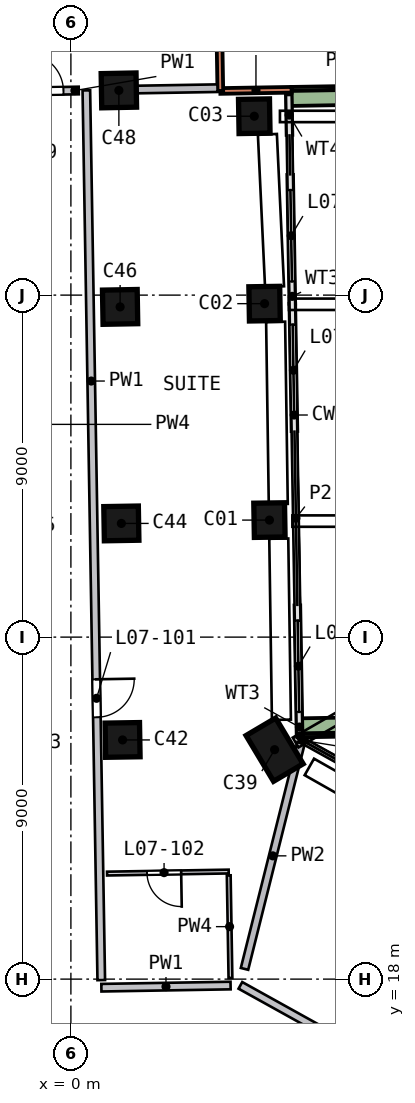
"""IFC4 building model, lengths in metres.
Left out: names, types, materials, properties, quantities, classifications, styles, units other than length and angle.
Written with IfcOpenShell. Run it as: python <this file> out.ifc"""

import sys

from ifc_helpers import new_model, si_unit, direction, frame, frame_2d, origin, origin_2d, place, context, subcontext, project, spatial, rectangle, extrude, element, fill, save


model = new_model("IFC4")
c1 = context("Model", 3, precision=1e-05, world=origin(), true_north=direction((0.0, 1.0)))
c2 = subcontext(c1, "Body", "Model", "MODEL_VIEW")
j1 = project(units=[si_unit("LENGTHUNIT", "METRE"), si_unit("PLANEANGLEUNIT", "RADIAN")], contexts=[c1])
p1 = place(None, origin())
s1 = spatial("IfcSite", under=j1, at=p1, CompositionType="ELEMENT")
p2 = place(p1, origin())
s2 = spatial("IfcBuilding", under=s1, at=p2, CompositionType="ELEMENT")
p3 = place(p2, frame((0.0, 0.0, 39.0)))
s3 = spatial("IfcBuildingStorey", under=s2, at=p3, CompositionType="ELEMENT", Elevation=39.0)
p4 = place(p3, frame((5.397, 30.059, 0.0), z_axis=(-0.142396599, 0.017420861, 0.989656366), x_axis=(-0.013831986, 0.99971245, -0.019588091)))
e1 = element("IfcColumn", 1, at=p4, inside=s3, PredefinedType="COLUMN", context=c2, shape_type="SweptSolid", body=[
    extrude(rectangle(XDim=0.9, YDim=0.8, at=origin_2d()), origin(), (0.0, 0.0, 1.0), 3.223),
])
p5 = place(p3, frame((5.302, 35.763, 0.0), z_axis=(-0.168451183, 0.009731394, 0.98566196), x_axis=(-0.01451993, 0.999818275, -0.012352637)))
e2 = element("IfcColumn", 2, at=p5, inside=s3, PredefinedType="COLUMN", context=c2, shape_type="SweptSolid", body=[
    extrude(rectangle(XDim=0.9, YDim=0.8, at=origin_2d()), origin(), (0.0, 0.0, 1.0), 3.236),
])
p6 = place(p3, frame((5.059, 40.706, 0.0), z_axis=(-0.190752832, 0.001427453, 0.981637061), x_axis=(-0.015840805, 0.999864255, -0.004532162)))
e3 = element("IfcColumn", 3, at=p6, inside=s3, PredefinedType="COLUMN", context=c2, shape_type="SweptSolid", body=[
    extrude(rectangle(XDim=0.9, YDim=0.8, at=origin_2d()), origin(), (0.0, 0.0, 1.0), 3.25),
])
p7 = place(p3, frame((5.499, 24.007, 0.0), z_axis=(-0.114391427, 0.025234521, 0.99311521), x_axis=(0.506584299, -0.858455681, 0.080163528)))
e4 = element("IfcColumn", 4, at=p7, inside=s3, PredefinedType="COLUMN", context=c2, shape_type="SweptSolid", body=[
    extrude(rectangle(XDim=1.4, YDim=0.9, at=origin_2d()), origin(), (0.0, 0.0, 1.0), 3.212),
])
p8 = place(p3, frame((1.5, 24.287, 0.0), z_axis=(-0.115550998, 0.006157652, 0.993282462), x_axis=(-0.015874823, 0.999841621, -0.008045071)))
e5 = element("IfcColumn", 5, at=p8, inside=s3, PredefinedType="COLUMN", context=c2, shape_type="SweptSolid", body=[
    extrude(rectangle(XDim=0.9, YDim=0.9, at=origin_2d()), origin(), (0.0, 0.0, 1.0), 3.211),
])
p9 = place(p3, frame((1.5, 29.993, 0.0), z_axis=(-0.141972782, -0.001060629, 0.989869994), x_axis=(-0.016583092, 0.999861637, -0.001307106)))
e6 = element("IfcColumn", 6, at=p9, inside=s3, PredefinedType="COLUMN", context=c2, shape_type="SweptSolid", body=[
    extrude(rectangle(XDim=0.9, YDim=0.9, at=origin_2d()), origin(), (0.0, 0.0, 1.0), 3.223),
])
p10 = place(p3, frame((1.5, 35.7, 0.0), z_axis=(-0.168086942, -0.008223284, 0.985737875), x_axis=(-0.017649546, 0.999830021, 0.005331263)))
e7 = element("IfcColumn", 7, at=p10, inside=s3, PredefinedType="COLUMN", context=c2, shape_type="SweptSolid", body=[
    extrude(rectangle(XDim=0.9, YDim=0.9, at=origin_2d()), origin(), (0.0, 0.0, 1.0), 3.236),
])
p11 = place(p3, frame((1.5, 41.406, 0.0), z_axis=(-0.193840405, -0.015315044, 0.980913527), x_axis=(-0.019055811, 0.999748273, 0.011843452)))
e8 = element("IfcColumn", 8, at=p11, inside=s3, PredefinedType="COLUMN", context=c2, shape_type="SweptSolid", body=[
    extrude(rectangle(XDim=0.9, YDim=0.9, at=origin_2d()), origin(), (0.0, 0.0, 1.0), 3.252),
])
p12 = place(p3, frame((5.807, 41.403, 0.0), z_axis=(0.0, 0.0, 1.0), x_axis=(-0.999861104, -0.016666522, 0.0)))
e9 = element("IfcWall", 9, at=p12, inside=s3, PredefinedType="SOLIDWALL", context=c2, shape_type="SweptSolid", body=[
    extrude(rectangle(XDim=1.875, YDim=0.15, at=frame_2d((0.938, 0.0))), origin(), (0.0, 0.0, 1.0), 3.19),
])
p13 = place(p3, frame((3.932, 41.372, 0.0), z_axis=(0.0, 0.0, 1.0), x_axis=(-0.016684694, 0.999860801, 0.0)))
e10 = element("IfcWall", 10, at=p13, inside=s3, PredefinedType="SOLIDWALL", context=c2, shape_type="SweptSolid", body=[
    extrude(rectangle(XDim=1.8, YDim=0.15, at=frame_2d((0.9, 0.0))), origin(), (0.0, 0.0, 1.0), 3.19),
])
p14 = place(p3, frame((6.017, 24.433, 0.0), z_axis=(0.0, 0.0, 1.0), x_axis=(-0.016793497, 0.999858979, 0.0)))
e11 = element("IfcWall", 11, at=p14, inside=s3, PredefinedType="SOLIDWALL", context=c2, shape_type="SweptSolid", body=[
    extrude(rectangle(XDim=3.402, YDim=0.15, at=frame_2d((1.701, 0.0))), origin(), (0.0, 0.0, 1.0), 2.425),
])
p15 = place(p14, frame((0.602, 0.0, 0.0)))
e12 = element("IfcOpeningElement", 12, at=p15, cuts=e11, PredefinedType="OPENING", context=c2, shape_type="SweptSolid", body=[
    extrude(rectangle(XDim=2.4, YDim=2.4, at=frame_2d((1.2, 1.2))), frame((0.0, 0.085, 0.0), z_axis=(0.0, -1.0, 0.0), x_axis=(1.0, 0.0, 0.0)), (0.0, 0.0, 1.0), 0.17),
])
p16 = place(p3, frame((5.883, 32.423, 0.0), z_axis=(0.0, 0.0, 1.0), x_axis=(-0.016762715, 0.999859496, 0.0)))
e13 = element("IfcWall", 13, at=p16, inside=s3, PredefinedType="SOLIDWALL", context=c2, shape_type="SweptSolid", body=[
    extrude(rectangle(XDim=3.35, YDim=0.15, at=frame_2d((1.675, 0.0))), origin(), (0.0, 0.0, 1.0), 2.425),
])
p17 = place(p16, frame((0.4, 0.0, 0.0)))
e14 = element("IfcOpeningElement", 14, at=p17, cuts=e13, PredefinedType="OPENING", context=c2, shape_type="SweptSolid", body=[
    extrude(rectangle(XDim=2.4, YDim=2.4, at=frame_2d((1.2, 1.2))), frame((0.0, 0.085, 0.0), z_axis=(0.0, -1.0, 0.0), x_axis=(1.0, 0.0, 0.0)), (0.0, 0.0, 1.0), 0.17),
])
p18 = place(p3, frame((5.826, 35.772, 0.0), z_axis=(0.0, 0.0, 1.0), x_axis=(-0.016705144, 0.999860459, 0.0)))
e15 = element("IfcWall", 15, at=p18, inside=s3, PredefinedType="SOLIDWALL", context=c2, shape_type="SweptSolid", body=[
    extrude(rectangle(XDim=3.391, YDim=0.15, at=frame_2d((1.695, 0.0))), origin(), (0.0, 0.0, 1.0), 2.425),
])
p19 = place(p18, frame((0.591, 0.0, 0.0)))
e16 = element("IfcOpeningElement", 16, at=p19, cuts=e15, PredefinedType="OPENING", context=c2, shape_type="SweptSolid", body=[
    extrude(rectangle(XDim=2.4, YDim=2.4, at=frame_2d((1.2, 1.2))), frame((0.0, 0.085, 0.0), z_axis=(0.0, -1.0, 0.0), x_axis=(1.0, 0.0, 0.0)), (0.0, 0.0, 1.0), 0.17),
])
p20 = place(p3, frame((5.752, 40.217, 0.0), z_axis=(0.0, 0.0, 1.0), x_axis=(-0.016668264, 0.999861075, 0.0)))
e17 = element("IfcWall", 17, at=p20, inside=s3, PredefinedType="SOLIDWALL", context=c2, shape_type="SweptSolid", body=[
    extrude(rectangle(XDim=1.04, YDim=0.15, at=frame_2d((0.52, 0.0))), origin(), (0.0, 0.0, 1.0), 2.425),
])
p21 = place(p3, frame((6.089, 24.614, 0.0), z_axis=(0.0, 0.0, 1.0), x_axis=(0.999859055, 0.016788963, 0.0)))
e18 = element("IfcWall", 18, at=p21, inside=s3, PredefinedType="SOLIDWALL", context=c2, shape_type="SweptSolid", body=[
    extrude(rectangle(XDim=3.199, YDim=0.5, at=frame_2d((1.6, 0.0))), origin(), (0.0, 0.0, 1.0), 0.7),
])
p22 = place(p3, frame((8.51, 41.274, 0.0), z_axis=(0.0, 0.0, 1.0), x_axis=(-0.999859982, -0.01673368, 0.0)))
e19 = element("IfcWall", 19, at=p22, inside=s3, PredefinedType="SOLIDWALL", context=c2, shape_type="SweptSolid", body=[
    extrude(rectangle(XDim=2.699, YDim=0.5, at=frame_2d((1.35, 0.0))), origin(), (0.0, 0.0, 1.0), 0.7),
])
p23 = place(p3, frame((-1.595, 41.354, 0.0), z_axis=(0.0, 0.0, 1.0), x_axis=(0.999858912, 0.016797521, 0.0)))
e20 = element("IfcWall", 20, at=p23, inside=s3, PredefinedType="SOLIDWALL", context=c2, shape_type="SweptSolid", body=[
    extrude(rectangle(XDim=1.802, YDim=0.2, at=frame_2d((0.901, 0.0))), origin(), (0.0, 0.0, 1.0), 3.19),
])
p24 = place(p23, frame((0.4, 0.0, 0.0)))
e21 = element("IfcOpeningElement", 21, at=p24, cuts=e20, PredefinedType="OPENING", context=c2, shape_type="SweptSolid", body=[
    extrude(rectangle(XDim=1.0, YDim=2.1, at=frame_2d((0.5, 1.05))), frame((0.0, 0.11, 0.0), z_axis=(0.0, -1.0, 0.0), x_axis=(1.0, 0.0, 0.0)), (0.0, 0.0, 1.0), 0.22),
])
p25 = place(p3, frame((0.406, 41.388, 0.0), z_axis=(0.0, 0.0, 1.0), x_axis=(0.016764935, -0.999859459, 0.0)))
e22 = element("IfcWall", 22, at=p25, inside=s3, PredefinedType="SOLIDWALL", context=c2, shape_type="SweptSolid", body=[
    extrude(rectangle(XDim=23.417, YDim=0.2, at=frame_2d((11.708, 0.0))), origin(), (0.0, 0.0, 1.0), 3.19),
])
p26 = place(p25, frame((15.5, 0.0, 0.0)))
e23 = element("IfcOpeningElement", 23, at=p26, cuts=e22, PredefinedType="OPENING", context=c2, shape_type="SweptSolid", body=[
    extrude(rectangle(XDim=1.0, YDim=2.1, at=frame_2d((0.5, 1.05))), frame((0.0, 0.11, 0.0), z_axis=(0.0, -1.0, 0.0), x_axis=(1.0, 0.0, 0.0)), (0.0, 0.0, 1.0), 0.22),
])
p27 = place(p3, frame((4.202, 17.831, 0.0), z_axis=(0.0, 0.0, 1.0), x_axis=(-0.999860021, -0.016731355, 0.0)))
e24 = element("IfcWall", 24, at=p27, inside=s3, PredefinedType="SOLIDWALL", context=c2, shape_type="SweptSolid", body=[
    extrude(rectangle(XDim=3.4, YDim=0.2, at=frame_2d((1.7, 0.0))), origin(), (0.0, 0.0, 1.0), 3.19),
])
p28 = place(p3, frame((12.78, 13.216, 0.0), z_axis=(0.0, 0.0, 1.0), x_axis=(-0.874284317, 0.485414188, 0.0)))
e25 = element("IfcWall", 25, at=p28, inside=s3, PredefinedType="SOLIDWALL", context=c2, shape_type="SweptSolid", body=[
    extrude(rectangle(XDim=9.516, YDim=0.2, at=frame_2d((4.758, 0.0))), origin(), (0.0, 0.0, 1.0), 3.19),
])
p29 = place(p3, frame((0.854, 41.396, 0.0), z_axis=(0.0, 0.0, 1.0), x_axis=(0.999859919, 0.016737457, 0.0)))
e26 = element("IfcWall", 26, at=p29, inside=s3, PredefinedType="SOLIDWALL", context=c2, shape_type="SweptSolid", body=[
    extrude(rectangle(XDim=3.005, YDim=0.2, at=frame_2d((1.502, 0.0))), origin(), (0.0, 0.0, 1.0), 3.19),
])
p30 = place(p3, frame((6.056, 24.218, 0.0), z_axis=(0.0, 0.0, 1.0), x_axis=(-0.242629305, -0.970119075, 0.0)))
e27 = element("IfcWall", 27, at=p30, inside=s3, PredefinedType="SOLIDWALL", context=c2, shape_type="SweptSolid", body=[
    extrude(rectangle(XDim=6.132, YDim=0.2, at=frame_2d((3.066, 0.0))), origin(), (0.0, 0.0, 1.0), 3.19),
])
p31 = place(p3, frame((4.152, 20.831, 0.0), z_axis=(0.0, 0.0, 1.0), x_axis=(-0.999859141, -0.01678384, 0.0)))
e28 = element("IfcWall", 28, at=p31, inside=s3, PredefinedType="PARTITIONING", context=c2, shape_type="SweptSolid", body=[
    extrude(rectangle(XDim=3.2, YDim=0.1, at=frame_2d((1.6, 0.0))), origin(), (0.0, 0.0, 1.0), 3.19),
])
p32 = place(p31, frame((1.25, 0.0, 0.0)))
e29 = element("IfcOpeningElement", 29, at=p32, cuts=e28, PredefinedType="OPENING", context=c2, shape_type="SweptSolid", body=[
    extrude(rectangle(XDim=0.9, YDim=2.1, at=frame_2d((0.45, 1.05))), frame((0.0, 0.06, 0.0), z_axis=(0.0, -1.0, 0.0), x_axis=(1.0, 0.0, 0.0)), (0.0, 0.0, 1.0), 0.12),
])
p33 = place(p3, frame((4.153, 20.731, 0.0), z_axis=(0.0, 0.0, 1.0), x_axis=(0.016729141, -0.999860058, 0.0)))
e30 = element("IfcWall", 30, at=p33, inside=s3, PredefinedType="PARTITIONING", context=c2, shape_type="SweptSolid", body=[
    extrude(rectangle(XDim=2.7, YDim=0.1, at=frame_2d((1.35, 0.0))), origin(), (0.0, 0.0, 1.0), 3.19),
])
p34 = place(p15, origin())
e31 = element("IfcDoor", 31, at=p34, inside=s3, OperationType="SLIDING_TO_LEFT", PredefinedType="DOOR", context=c2, shape_type="SweptSolid", body=[
    extrude(rectangle(XDim=2.4, YDim=2.4, at=frame_2d((1.2, 1.2))), frame((0.0, 0.025, 0.0), z_axis=(0.0, -1.0, 0.0), x_axis=(1.0, 0.0, 0.0)), (0.0, 0.0, 1.0), 0.05),
])
fill(e12, e31)
p35 = place(p17, origin())
e32 = element("IfcDoor", 32, at=p35, inside=s3, OperationType="SLIDING_TO_RIGHT", PredefinedType="DOOR", context=c2, shape_type="SweptSolid", body=[
    extrude(rectangle(XDim=2.4, YDim=2.4, at=frame_2d((1.2, 1.2))), frame((0.0, 0.025, 0.0), z_axis=(0.0, -1.0, 0.0), x_axis=(1.0, 0.0, 0.0)), (0.0, 0.0, 1.0), 0.05),
])
fill(e14, e32)
p36 = place(p19, origin())
e33 = element("IfcDoor", 33, at=p36, inside=s3, OperationType="SLIDING_TO_LEFT", PredefinedType="DOOR", context=c2, shape_type="SweptSolid", body=[
    extrude(rectangle(XDim=2.4, YDim=2.4, at=frame_2d((1.2, 1.2))), frame((0.0, 0.025, 0.0), z_axis=(0.0, -1.0, 0.0), x_axis=(1.0, 0.0, 0.0)), (0.0, 0.0, 1.0), 0.05),
])
fill(e16, e33)
p37 = place(p26, origin())
e34 = element("IfcDoor", 34, at=p37, inside=s3, OperationType="SINGLE_SWING_LEFT", PredefinedType="DOOR", context=c2, shape_type="SweptSolid", body=[
    extrude(rectangle(XDim=1.0, YDim=2.1, at=frame_2d((0.5, 1.05))), frame((0.0, 0.025, 0.0), z_axis=(0.0, -1.0, 0.0), x_axis=(1.0, 0.0, 0.0)), (0.0, 0.0, 1.0), 0.05),
])
fill(e23, e34)
p38 = place(p32, origin())
e35 = element("IfcDoor", 35, at=p38, inside=s3, OperationType="SINGLE_SWING_LEFT", PredefinedType="DOOR", context=c2, shape_type="SweptSolid", body=[
    extrude(rectangle(XDim=0.9, YDim=2.1, at=frame_2d((0.45, 1.05))), frame((0.0, 0.025, 0.0), z_axis=(0.0, -1.0, 0.0), x_axis=(1.0, 0.0, 0.0)), (0.0, 0.0, 1.0), 0.05),
])
fill(e29, e35)
p39 = place(p24, origin())
e36 = element("IfcDoor", 36, at=p39, inside=s3, OperationType="SINGLE_SWING_LEFT", PredefinedType="DOOR", context=c2, shape_type="SweptSolid", body=[
    extrude(rectangle(XDim=1.0, YDim=2.1, at=frame_2d((0.5, 1.05))), frame((0.0, 0.025, 0.0), z_axis=(0.0, -1.0, 0.0), x_axis=(1.0, 0.0, 0.0)), (0.0, 0.0, 1.0), 0.05),
])
fill(e21, e36)
save(model, sys.argv[1])
